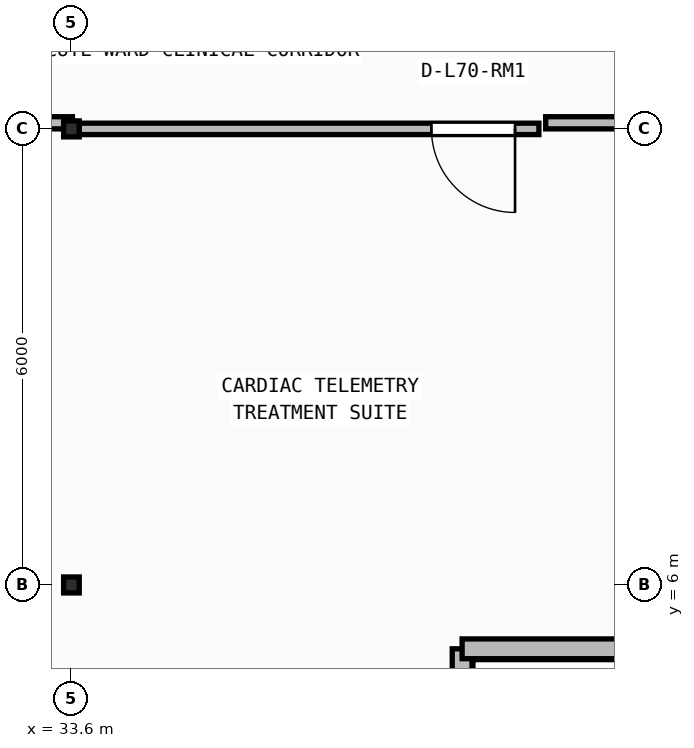
"""IFC4 building model, lengths in metres.
Left out: names, types, materials, properties, quantities, classifications, styles, units other than length and angle.
Written with IfcOpenShell. Run it as: python <this file> out.ifc"""

import sys

from ifc_helpers import new_model, si_unit, direction, frame, frame_2d, origin, origin_2d, place, context, subcontext, project, spatial, rectangle, i_section, extrude, element, fill, save


model = new_model("IFC4")
c1 = context("Model", 3, precision=1e-05, world=origin(), true_north=direction((0.0, 1.0)))
c2 = subcontext(c1, "Body", "Model", "MODEL_VIEW")
j1 = project(units=[si_unit("LENGTHUNIT", "METRE"), si_unit("PLANEANGLEUNIT", "RADIAN")], contexts=[c1])
p1 = place(None, origin())
s1 = spatial("IfcSite", under=j1, at=p1, CompositionType="ELEMENT")
p2 = place(p1, origin())
s2 = spatial("IfcBuilding", under=s1, at=p2, CompositionType="ELEMENT")
p3 = place(p2, frame((0.0, 0.0, 284.2)))
s3 = spatial("IfcBuildingStorey", under=s2, at=p3, CompositionType="ELEMENT", Elevation=284.2)
for number, where, z_axis, x_axis in (
    (1, (33.6, 6.0, 0.0), (0.0, 0.0, 1.0), (1.0, 0.0, 0.0)),
    (2, (33.6, 12.0, 0.0), (0.0, 0.0, 1.0), (1.0, 0.0, 0.0)),
):
    element("IfcColumn", number, at=place(p3, frame(where, z_axis=z_axis, x_axis=x_axis)), inside=s3, PredefinedType="COLUMN", context=c2, shape_type="SweptSolid", body=[
        extrude(i_section(OverallWidth=0.205, OverallDepth=0.21, WebThickness=0.009, FlangeThickness=0.014, FilletRadius=0.011, at=origin_2d()), origin(), (0.0, 0.0, 1.0), 3.95),
    ])
p4 = place(p3, frame((38.74, 2.849, 0.0), z_axis=(0.0, 0.0, 1.0), x_axis=(0.0, 1.0, 0.0)))
e3 = element("IfcWall", 3, at=p4, inside=s3, PredefinedType="STANDARD", context=c2, shape_type="SweptSolid", body=[
    extrude(rectangle(XDim=2.311, YDim=0.26, at=frame_2d((1.156, 0.0))), origin(), (0.0, 0.0, 1.0), 3.71),
])
p5 = place(p3, frame((38.74, 5.16, 0.0), z_axis=(0.0, 0.0, 1.0), x_axis=(1.0, 0.0, 0.0)))
e4 = element("IfcWall", 4, at=p5, inside=s3, PredefinedType="STANDARD", context=c2, shape_type="SweptSolid", body=[
    extrude(rectangle(XDim=2.3, YDim=0.26, at=frame_2d((1.15, 0.0))), origin(), (0.0, 0.0, 1.0), 3.71),
])
p6 = place(p3, frame((39.75, 12.0, 0.0), z_axis=(0.0, 0.0, 1.0), x_axis=(-1.0, 0.0, 0.0)))
e5 = element("IfcWall", 5, at=p6, inside=s3, PredefinedType="PARTITIONING", context=c2, shape_type="SweptSolid", body=[
    extrude(rectangle(XDim=6.048, YDim=0.15, at=frame_2d((3.024, 0.0))), origin(), (0.0, 0.0, 1.0), 3.71),
])
p7 = place(p6, frame((0.314, 0.0, 0.0)))
e6 = element("IfcOpeningElement", 6, at=p7, cuts=e5, PredefinedType="OPENING", context=c2, shape_type="SweptSolid", body=[
    extrude(rectangle(XDim=1.1, YDim=2.1, at=frame_2d((0.55, 1.05))), frame((0.0, 0.085, 0.0), z_axis=(0.0, -1.0, 0.0), x_axis=(1.0, 0.0, 0.0)), (0.0, 0.0, 1.0), 0.17),
])
p8 = place(p3, frame((31.439, 12.08, 0.0), z_axis=(0.0, 0.0, 1.0), x_axis=(1.0, 0.0, 0.0)))
e7 = element("IfcWall", 7, at=p8, inside=s3, PredefinedType="PARTITIONING", context=c2, shape_type="SweptSolid", body=[
    extrude(rectangle(XDim=2.174, YDim=0.16, at=frame_2d((1.087, 0.0))), origin(), (0.0, 0.0, 1.0), 3.157),
])
p9 = place(p3, frame((39.839, 12.08, 0.0), z_axis=(0.0, 0.0, 1.0), x_axis=(1.0, 0.0, 0.0)))
e8 = element("IfcWall", 8, at=p9, inside=s3, PredefinedType="PARTITIONING", context=c2, shape_type="SweptSolid", body=[
    extrude(rectangle(XDim=1.061, YDim=0.16, at=frame_2d((0.53, 0.0))), origin(), (0.0, 0.0, 1.0), 3.71),
])
p10 = place(p7, origin())
e9 = element("IfcDoor", 9, at=p10, inside=s3, OperationType="SINGLE_SWING_LEFT", PredefinedType="DOOR", context=c2, shape_type="SweptSolid", body=[
    extrude(rectangle(XDim=1.1, YDim=2.1, at=frame_2d((0.55, 1.05))), frame((0.0, 0.025, 0.0), z_axis=(0.0, -1.0, 0.0), x_axis=(1.0, 0.0, 0.0)), (0.0, 0.0, 1.0), 0.05),
])
fill(e6, e9)
save(model, sys.argv[1])
